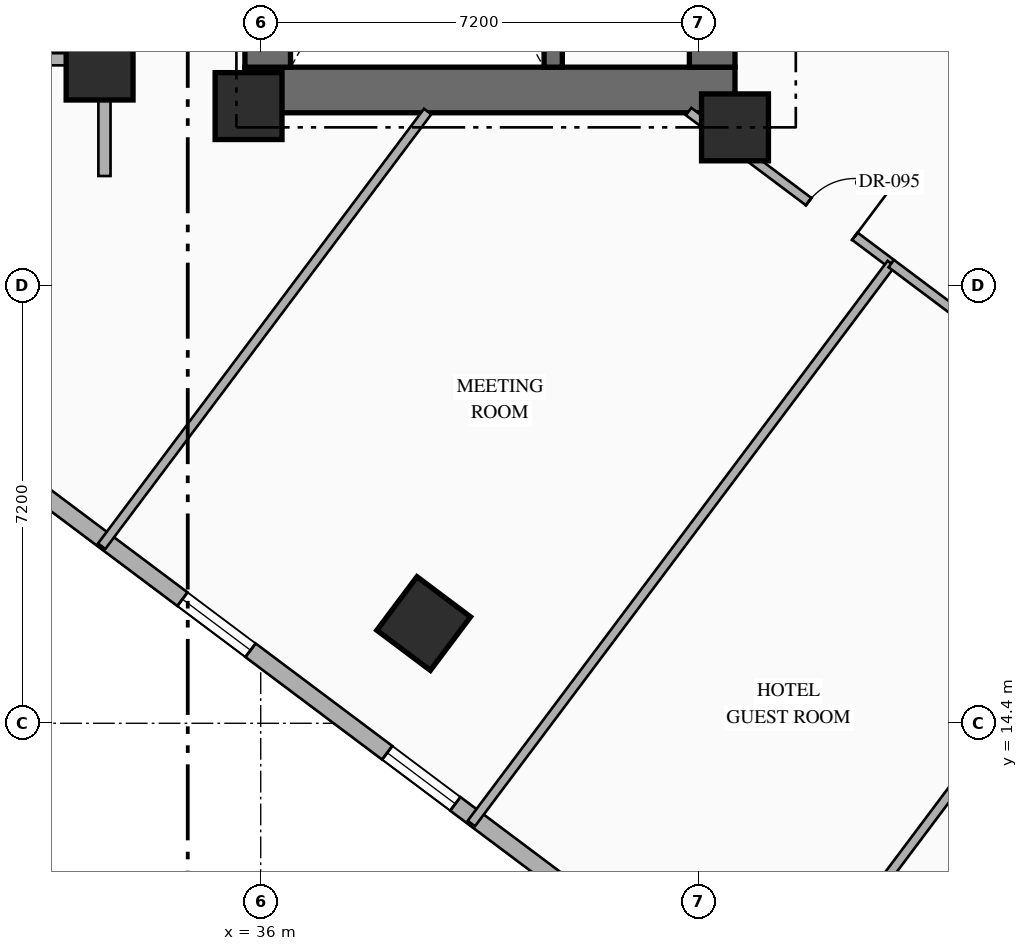
"""IFC4 building model, lengths in metres.
Left out: names, types, materials, properties, quantities, classifications, styles, units other than length and angle.
Written with IfcOpenShell. Run it as: python <this file> out.ifc"""

import sys

from ifc_helpers import new_model, si_unit, direction, frame, frame_2d, origin, origin_2d, place, context, subcontext, project, spatial, rectangle, hollow_rectangle, extrude, element, fill, save


model = new_model("IFC4")
c1 = context("Model", 3, precision=1e-05, world=origin(), true_north=direction((0.0, 1.0)))
c2 = subcontext(c1, "Body", "Model", "MODEL_VIEW")
j1 = project(units=[si_unit("LENGTHUNIT", "METRE"), si_unit("PLANEANGLEUNIT", "RADIAN")], contexts=[c1])
p1 = place(None, origin())
s1 = spatial("IfcSite", under=j1, at=p1, CompositionType="ELEMENT")
p2 = place(p1, origin())
s2 = spatial("IfcBuilding", under=s1, at=p2, CompositionType="ELEMENT")
p3 = place(p2, frame((0.0, 0.0, 43.3)))
s3 = spatial("IfcBuildingStorey", under=s2, at=p3, CompositionType="ELEMENT", Elevation=43.3)
p4 = place(p3, frame((35.74, 24.815, 0.0), z_axis=(0.0, 0.0, 1.0), x_axis=(1.0, 0.0, 0.0)))
e1 = element("IfcWall", 1, at=p4, inside=s3, PredefinedType="SHEAR", context=c2, shape_type="SweptSolid", body=[
    extrude(rectangle(XDim=8.06, YDim=0.75, at=frame_2d((4.03, 0.0))), origin(), (0.0, 0.0, 1.0), 3.35),
])
p5 = place(p3, frame((36.115, 25.19, 0.0), z_axis=(0.0, 0.0, 1.0), x_axis=(0.0, 1.0, 0.0)))
e2 = element("IfcWall", 2, at=p5, inside=s3, PredefinedType="SHEAR", context=c2, shape_type="SweptSolid", body=[
    extrude(rectangle(XDim=9.48, YDim=0.75, at=frame_2d((4.74, 0.0))), origin(), (0.0, 0.0, 1.0), 3.35),
])
p6 = place(p3, frame((43.425, 25.19, 0.0), z_axis=(0.0, 0.0, 1.0), x_axis=(0.0, 1.0, 0.0)))
e3 = element("IfcWall", 3, at=p6, inside=s3, PredefinedType="SHEAR", context=c2, shape_type="SweptSolid", body=[
    extrude(rectangle(XDim=9.48, YDim=0.75, at=frame_2d((4.74, 0.0))), origin(), (0.0, 0.0, 1.0), 3.35),
])
p7 = place(p6, frame((1.51, 0.0, 0.0)))
e4 = element("IfcOpeningElement", 4, at=p7, cuts=e3, PredefinedType="OPENING", context=c2, shape_type="SweptSolid", body=[
    extrude(rectangle(XDim=0.85, YDim=2.08, at=frame_2d((0.425, 1.04))), frame((0.0, 0.385, 0.0), z_axis=(0.0, -1.0, 0.0), x_axis=(1.0, 0.0, 0.0)), (0.0, 0.0, 1.0), 0.77),
])
p8 = place(p6, frame((4.76, 0.0, 0.0)))
e5 = element("IfcOpeningElement", 5, at=p8, cuts=e3, PredefinedType="OPENING", context=c2, shape_type="SweptSolid", body=[
    extrude(rectangle(XDim=0.85, YDim=2.08, at=frame_2d((0.425, 1.04))), frame((0.0, 0.385, 0.0), z_axis=(0.0, -1.0, 0.0), x_axis=(1.0, 0.0, 0.0)), (0.0, 0.0, 1.0), 0.77),
])
p9 = place(p3, frame((40.81, 25.19, 0.0), z_axis=(0.0, 0.0, 1.0), x_axis=(0.0, 1.0, 0.0)))
e6 = element("IfcWall", 6, at=p9, inside=s3, PredefinedType="SHEAR", context=c2, shape_type="SweptSolid", body=[
    extrude(rectangle(XDim=9.48, YDim=0.3, at=frame_2d((4.74, 0.0))), origin(), (0.0, 0.0, 1.0), 3.35),
])
for number, where, z_axis, x_axis in (
    (7, (35.8, 24.55, 0.0), (0.0, 0.0, 1.0), (1.0, 0.0, 0.0)),
    (8, (43.8, 24.2, 0.0), (0.0, 0.0, 1.0), (1.0, 0.0, 0.0)),
):
    element("IfcColumn", number, at=place(p3, frame(where, z_axis=z_axis, x_axis=x_axis)), inside=s3, PredefinedType="COLUMN", context=c2, shape_type="SweptSolid", body=[
        extrude(rectangle(XDim=1.1, YDim=1.1, at=origin_2d()), origin(), (0.0, 0.0, 1.0), 3.35),
    ])
for number, where, z_axis, x_axis in (
    (9, (33.35, 25.2, 0.0), (0.0, 0.0, 1.0), (1.0, 0.0, 0.0)),
    (10, (38.68, 16.04, 0.0), (0.0, 0.0, 1.0), (0.8, -0.6, 0.0)),
):
    element("IfcColumn", number, at=place(p3, frame(where, z_axis=z_axis, x_axis=x_axis)), inside=s3, PredefinedType="COLUMN", context=c2, shape_type="SweptSolid", body=[
        extrude(hollow_rectangle(XDim=1.1, YDim=1.1, WallThickness=0.04, at=origin_2d()), origin(), (0.0, 0.0, 1.0), 3.35),
    ])
p10 = place(p3, frame((44.86, 40.73, 0.0), z_axis=(0.0, 0.0, 1.0), x_axis=(0.800006902154, -0.599990797017, 0.0)))
e11 = element("IfcWall", 11, at=p10, inside=s3, PredefinedType="STANDARD", context=c2, shape_type="SweptSolid", body=[
    extrude(rectangle(XDim=29.712, YDim=0.28, at=frame_2d((14.856, 0.0))), origin(), (0.0, 0.0, 1.0), 3.13),
])
p11 = place(p10, frame((14.249, 0.0, 0.0)))
e12 = element("IfcOpeningElement", 12, at=p11, cuts=e11, PredefinedType="OPENING", context=c2, shape_type="SweptSolid", body=[
    extrude(rectangle(XDim=1.1, YDim=2.2, at=frame_2d((0.55, 1.1))), frame((0.0, 0.15, 0.0), z_axis=(0.0, -1.0, 0.0), x_axis=(1.0, 0.0, 0.0)), (0.0, 0.0, 1.0), 0.3),
])
p12 = place(p10, frame((1.612, 0.0, 0.85)))
e13 = element("IfcOpeningElement", 13, at=p12, cuts=e11, PredefinedType="OPENING", context=c2, shape_type="SweptSolid", body=[
    extrude(rectangle(XDim=1.4, YDim=1.8, at=frame_2d((0.7, 0.9))), frame((0.0, 0.15, 0.0), z_axis=(0.0, -1.0, 0.0), x_axis=(1.0, 0.0, 0.0)), (0.0, 0.0, 1.0), 0.3),
])
p13 = place(p10, frame((5.667, 0.0, 0.85)))
e14 = element("IfcOpeningElement", 14, at=p13, cuts=e11, PredefinedType="OPENING", context=c2, shape_type="SweptSolid", body=[
    extrude(rectangle(XDim=1.4, YDim=1.8, at=frame_2d((0.7, 0.9))), frame((0.0, 0.15, 0.0), z_axis=(0.0, -1.0, 0.0), x_axis=(1.0, 0.0, 0.0)), (0.0, 0.0, 1.0), 0.3),
])
p14 = place(p10, frame((9.912, 0.0, 0.85)))
e15 = element("IfcOpeningElement", 15, at=p14, cuts=e11, PredefinedType="OPENING", context=c2, shape_type="SweptSolid", body=[
    extrude(rectangle(XDim=1.4, YDim=1.8, at=frame_2d((0.7, 0.9))), frame((0.0, 0.15, 0.0), z_axis=(0.0, -1.0, 0.0), x_axis=(1.0, 0.0, 0.0)), (0.0, 0.0, 1.0), 0.3),
])
p15 = place(p10, frame((19.528, 0.0, 0.85)))
e16 = element("IfcOpeningElement", 16, at=p15, cuts=e11, PredefinedType="OPENING", context=c2, shape_type="SweptSolid", body=[
    extrude(rectangle(XDim=1.4, YDim=1.8, at=frame_2d((0.7, 0.9))), frame((0.0, 0.15, 0.0), z_axis=(0.0, -1.0, 0.0), x_axis=(1.0, 0.0, 0.0)), (0.0, 0.0, 1.0), 0.3),
])
p16 = place(p10, frame((23.451, 0.0, 0.85)))
e17 = element("IfcOpeningElement", 17, at=p16, cuts=e11, PredefinedType="OPENING", context=c2, shape_type="SweptSolid", body=[
    extrude(rectangle(XDim=1.4, YDim=1.8, at=frame_2d((0.7, 0.9))), frame((0.0, 0.15, 0.0), z_axis=(0.0, -1.0, 0.0), x_axis=(1.0, 0.0, 0.0)), (0.0, 0.0, 1.0), 0.3),
])
p17 = place(p10, frame((27.852, 0.0, 0.85)))
e18 = element("IfcOpeningElement", 18, at=p17, cuts=e11, PredefinedType="OPENING", context=c2, shape_type="SweptSolid", body=[
    extrude(rectangle(XDim=1.4, YDim=1.8, at=frame_2d((0.7, 0.9))), frame((0.0, 0.15, 0.0), z_axis=(0.0, -1.0, 0.0), x_axis=(1.0, 0.0, 0.0)), (0.0, 0.0, 1.0), 0.3),
])
p18 = place(p3, frame((53.318, 2.487, 0.0), z_axis=(0.0, 0.0, 1.0), x_axis=(-0.800004174678, 0.599994433723, 0.0)))
e19 = element("IfcWall", 19, at=p18, inside=s3, PredefinedType="STANDARD", context=c2, shape_type="SweptSolid", body=[
    extrude(rectangle(XDim=35.089, YDim=0.28, at=frame_2d((17.544, 0.0))), origin(), (0.0, 0.0, 1.0), 3.13),
])
p19 = place(p18, frame((1.931, 0.0, 0.85)))
e20 = element("IfcOpeningElement", 20, at=p19, cuts=e19, PredefinedType="OPENING", context=c2, shape_type="SweptSolid", body=[
    extrude(rectangle(XDim=1.4, YDim=1.8, at=frame_2d((0.7, 0.9))), frame((0.0, 0.15, 0.0), z_axis=(0.0, -1.0, 0.0), x_axis=(1.0, 0.0, 0.0)), (0.0, 0.0, 1.0), 0.3),
])
p20 = place(p18, frame((6.819, 0.0, 0.85)))
e21 = element("IfcOpeningElement", 21, at=p20, cuts=e19, PredefinedType="OPENING", context=c2, shape_type="SweptSolid", body=[
    extrude(rectangle(XDim=1.4, YDim=1.8, at=frame_2d((0.7, 0.9))), frame((0.0, 0.15, 0.0), z_axis=(0.0, -1.0, 0.0), x_axis=(1.0, 0.0, 0.0)), (0.0, 0.0, 1.0), 0.3),
])
p21 = place(p18, frame((11.832, 0.0, 0.85)))
e22 = element("IfcOpeningElement", 22, at=p21, cuts=e19, PredefinedType="OPENING", context=c2, shape_type="SweptSolid", body=[
    extrude(rectangle(XDim=1.4, YDim=1.8, at=frame_2d((0.7, 0.9))), frame((0.0, 0.15, 0.0), z_axis=(0.0, -1.0, 0.0), x_axis=(1.0, 0.0, 0.0)), (0.0, 0.0, 1.0), 0.3),
])
p22 = place(p18, frame((17.647, 0.0, 0.85)))
e23 = element("IfcOpeningElement", 23, at=p22, cuts=e19, PredefinedType="OPENING", context=c2, shape_type="SweptSolid", body=[
    extrude(rectangle(XDim=1.4, YDim=1.8, at=frame_2d((0.7, 0.9))), frame((0.0, 0.15, 0.0), z_axis=(0.0, -1.0, 0.0), x_axis=(1.0, 0.0, 0.0)), (0.0, 0.0, 1.0), 0.3),
])
p23 = place(p18, frame((21.857, 0.0, 0.85)))
e24 = element("IfcOpeningElement", 24, at=p23, cuts=e19, PredefinedType="OPENING", context=c2, shape_type="SweptSolid", body=[
    extrude(rectangle(XDim=1.4, YDim=1.8, at=frame_2d((0.7, 0.9))), frame((0.0, 0.15, 0.0), z_axis=(0.0, -1.0, 0.0), x_axis=(1.0, 0.0, 0.0)), (0.0, 0.0, 1.0), 0.3),
])
p24 = place(p18, frame((26.87, 0.0, 0.85)))
e25 = element("IfcOpeningElement", 25, at=p24, cuts=e19, PredefinedType="OPENING", context=c2, shape_type="SweptSolid", body=[
    extrude(rectangle(XDim=1.4, YDim=1.8, at=frame_2d((0.7, 0.9))), frame((0.0, 0.15, 0.0), z_axis=(0.0, -1.0, 0.0), x_axis=(1.0, 0.0, 0.0)), (0.0, 0.0, 1.0), 0.3),
])
p25 = place(p18, frame((31.757, 0.0, 0.85)))
e26 = element("IfcOpeningElement", 26, at=p25, cuts=e19, PredefinedType="OPENING", context=c2, shape_type="SweptSolid", body=[
    extrude(rectangle(XDim=1.4, YDim=1.8, at=frame_2d((0.7, 0.9))), frame((0.0, 0.15, 0.0), z_axis=(0.0, -1.0, 0.0), x_axis=(1.0, 0.0, 0.0)), (0.0, 0.0, 1.0), 0.3),
])
p26 = place(p3, frame((33.43, 23.4, 0.0), z_axis=(0.0, 0.0, 1.0), x_axis=(0.0, 1.0, 0.0)))
e27 = element("IfcWall", 27, at=p26, inside=s3, PredefinedType="STANDARD", context=c2, shape_type="SweptSolid", body=[
    extrude(rectangle(XDim=4.08, YDim=0.2, at=frame_2d((2.04, 0.0))), origin(), (0.0, 0.0, 1.0), 2.425),
])
p27 = place(p3, frame((25.55, 25.32, 0.0), z_axis=(0.0, 0.0, 1.0), x_axis=(1.0, 0.0, 0.0)))
e28 = element("IfcWall", 28, at=p27, inside=s3, PredefinedType="STANDARD", context=c2, shape_type="SweptSolid", body=[
    extrude(rectangle(XDim=7.88, YDim=0.2, at=frame_2d((3.94, 0.0))), origin(), (0.0, 0.0, 1.0), 2.525),
])
p28 = place(p3, frame((43.037, 24.46, 0.0), z_axis=(0.0, 0.0, 1.0), x_axis=(0.799971872363, -0.600037501685, 0.0)))
e29 = element("IfcWall", 29, at=p28, inside=s3, PredefinedType="PARTITIONING", context=c2, shape_type="SweptSolid", body=[
    extrude(rectangle(XDim=4.167, YDim=0.15, at=frame_2d((2.083, 0.0))), origin(), (0.0, 0.0, 1.0), 2.425),
])
p29 = place(p28, frame((2.468, 0.0, 0.0)))
e30 = element("IfcOpeningElement", 30, at=p29, cuts=e29, PredefinedType="OPENING", context=c2, shape_type="SweptSolid", body=[
    extrude(rectangle(XDim=0.95, YDim=2.15, at=frame_2d((0.475, 1.075))), frame((0.0, 0.085, 0.0), z_axis=(0.0, -1.0, 0.0), x_axis=(1.0, 0.0, 0.0)), (0.0, 0.0, 1.0), 0.17),
])
p30 = place(p3, frame((33.384, 17.312, 0.0), z_axis=(0.0, 0.0, 1.0), x_axis=(0.600008743659, 0.799993442181, 0.0)))
e31 = element("IfcWall", 31, at=p30, inside=s3, PredefinedType="PARTITIONING", context=c2, shape_type="SweptSolid", body=[
    extrude(rectangle(XDim=8.935, YDim=0.15, at=frame_2d((4.468, 0.0))), origin(), (0.0, 0.0, 1.0), 3.13),
])
p31 = place(p3, frame((39.464, 12.752, 0.0), z_axis=(0.0, 0.0, 1.0), x_axis=(0.6, 0.8, 0.0)))
e32 = element("IfcWall", 32, at=p31, inside=s3, PredefinedType="PARTITIONING", context=c2, shape_type="SweptSolid", body=[
    extrude(rectangle(XDim=11.51, YDim=0.15, at=frame_2d((5.755, 0.0))), origin(), (0.0, 0.0, 1.0), 3.13),
])
p32 = place(p3, frame((46.37, 21.96, 0.0), z_axis=(0.0, 0.0, 1.0), x_axis=(0.799977170108, -0.600030438649, 0.0)))
e33 = element("IfcWall", 33, at=p32, inside=s3, PredefinedType="PARTITIONING", context=c2, shape_type="SweptSolid", body=[
    extrude(rectangle(XDim=3.85, YDim=0.15, at=frame_2d((1.925, 0.0))), origin(), (0.0, 0.0, 1.0), 2.425),
])
p33 = place(p32, frame((1.45, 0.0, 0.0)))
e34 = element("IfcOpeningElement", 34, at=p33, cuts=e33, PredefinedType="OPENING", context=c2, shape_type="SweptSolid", body=[
    extrude(rectangle(XDim=0.95, YDim=2.15, at=frame_2d((0.475, 1.075))), frame((0.0, 0.085, 0.0), z_axis=(0.0, -1.0, 0.0), x_axis=(1.0, 0.0, 0.0)), (0.0, 0.0, 1.0), 0.17),
])
p34 = place(p3, frame((44.36, 9.28, 0.0), z_axis=(0.0, 0.0, 1.0), x_axis=(0.599986233332, 0.800010324816, 0.0)))
e35 = element("IfcWall", 35, at=p34, inside=s3, PredefinedType="PARTITIONING", context=c2, shape_type="SweptSolid", body=[
    extrude(rectangle(XDim=11.35, YDim=0.15, at=frame_2d((5.675, 0.0))), origin(), (0.0, 0.0, 1.0), 2.425),
])
p35 = place(p22, origin())
e36 = element("IfcWindow", 36, at=p35, inside=s3, PartitioningType="SINGLE_PANEL", PredefinedType="WINDOW", context=c2, shape_type="SweptSolid", body=[
    extrude(rectangle(XDim=1.4, YDim=1.8, at=frame_2d((0.7, 0.9))), frame((0.0, 0.03, 0.0), z_axis=(0.0, -1.0, 0.0), x_axis=(1.0, 0.0, 0.0)), (0.0, 0.0, 1.0), 0.06),
])
fill(e23, e36)
p36 = place(p23, origin())
e37 = element("IfcWindow", 37, at=p36, inside=s3, PartitioningType="SINGLE_PANEL", PredefinedType="WINDOW", context=c2, shape_type="SweptSolid", body=[
    extrude(rectangle(XDim=1.4, YDim=1.8, at=frame_2d((0.7, 0.9))), frame((0.0, 0.03, 0.0), z_axis=(0.0, -1.0, 0.0), x_axis=(1.0, 0.0, 0.0)), (0.0, 0.0, 1.0), 0.06),
])
fill(e24, e37)
p37 = place(p29, origin())
e38 = element("IfcDoor", 38, at=p37, inside=s3, OperationType="SINGLE_SWING_RIGHT", PredefinedType="DOOR", context=c2, shape_type="SweptSolid", body=[
    extrude(rectangle(XDim=0.95, YDim=2.15, at=frame_2d((0.475, 1.075))), frame((0.0, 0.025, 0.0), z_axis=(0.0, -1.0, 0.0), x_axis=(1.0, 0.0, 0.0)), (0.0, 0.0, 1.0), 0.05),
])
fill(e30, e38)
save(model, sys.argv[1])
